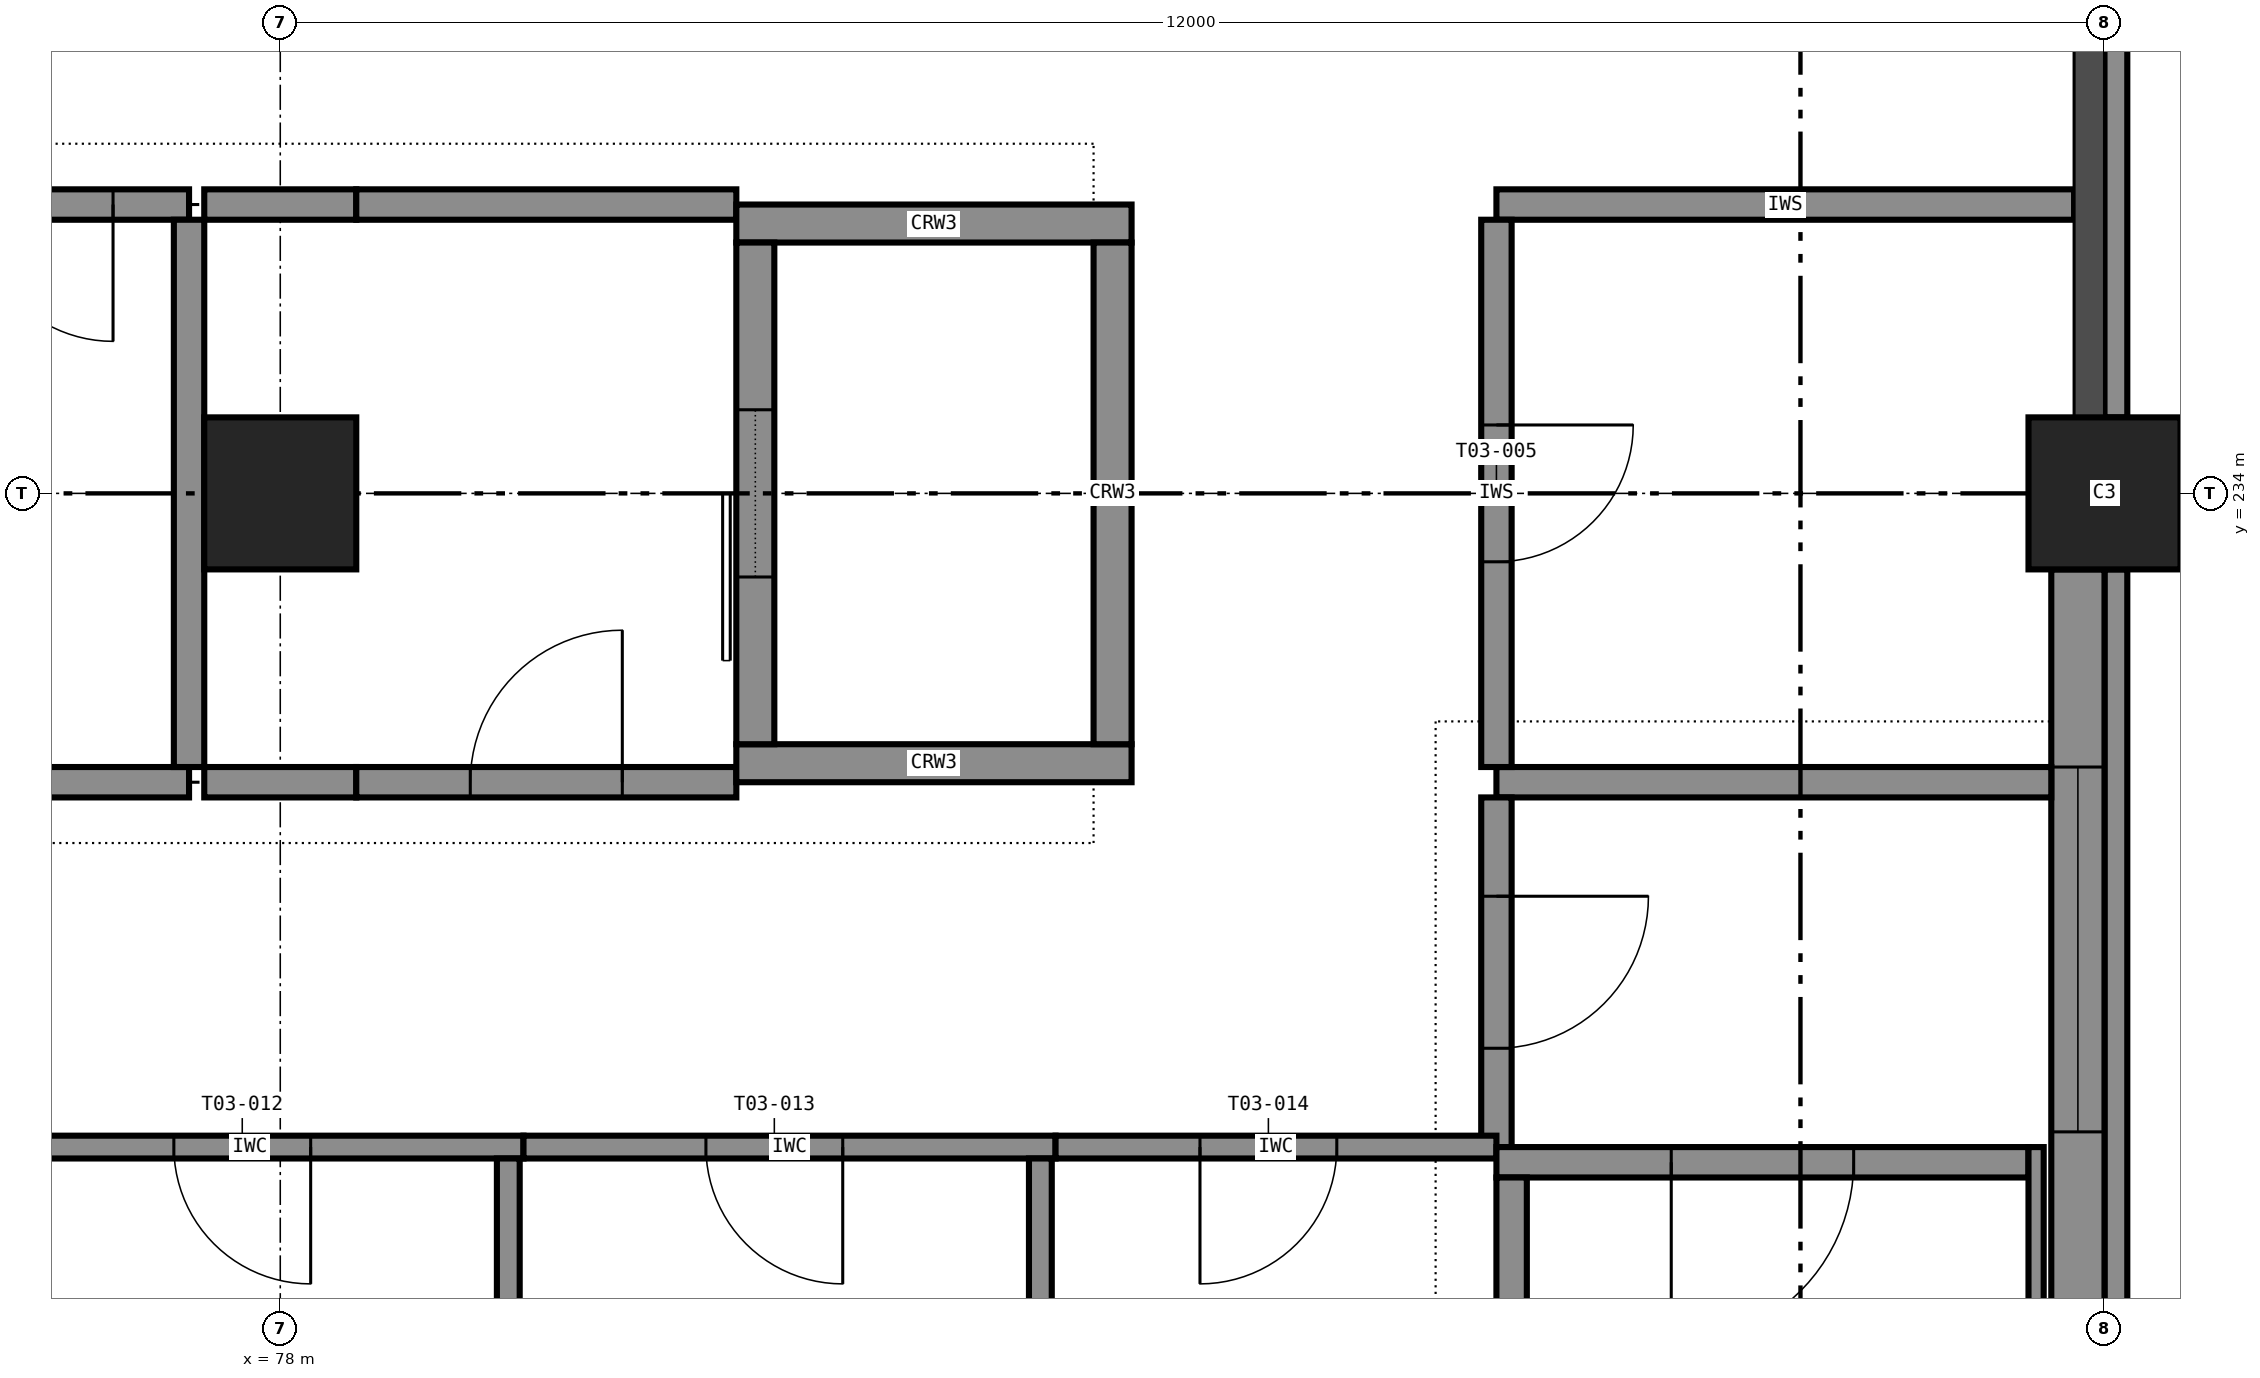
"""IFC4 building model, lengths in metres.
Left out: names, types, materials, properties, quantities, classifications, styles, units other than length and angle.
Written with IfcOpenShell. Run it as: python <this file> out.ifc"""

import sys

from ifc_helpers import new_model, si_unit, direction, frame, frame_2d, origin, origin_2d, place, context, subcontext, project, spatial, rectangle, extrude, element, fill, save


model = new_model("IFC4")
c1 = context("Model", 3, precision=1e-05, world=origin(), true_north=direction((0.0, 1.0)))
c2 = subcontext(c1, "Body", "Model", "MODEL_VIEW")
j1 = project(units=[si_unit("LENGTHUNIT", "METRE"), si_unit("PLANEANGLEUNIT", "RADIAN")], contexts=[c1])
p1 = place(None, origin())
s1 = spatial("IfcSite", under=j1, at=p1, CompositionType="ELEMENT")
p2 = place(p1, origin())
s2 = spatial("IfcBuilding", under=s1, at=p2, CompositionType="ELEMENT")
p3 = place(p2, frame((0.0, 0.0, 17.0)))
s3 = spatial("IfcBuildingStorey", under=s2, at=p3, CompositionType="ELEMENT", Elevation=17.0)
for number, where, z_axis, x_axis in (
    (1, (78.0, 234.0, 0.0), (0.0, 0.0, 1.0), (1.0, 0.0, 0.0)),
    (2, (90.0, 234.0, 0.0), (0.0, 0.0, 1.0), (1.0, 0.0, 0.0)),
):
    element("IfcColumn", number, at=place(p3, frame(where, z_axis=z_axis, x_axis=x_axis)), inside=s3, PredefinedType="COLUMN", context=c2, shape_type="SweptSolid", body=[
        extrude(rectangle(XDim=1.0, YDim=1.0, at=origin_2d()), origin(), (0.0, 0.0, 1.0), 4.0),
    ])
for number, where, z_axis, x_axis in (
    (3, (81.0, 232.225, 0.0), (0.0, 0.0, 1.0), (1.0, 0.0, 0.0)),
    (4, (81.0, 235.775, 0.0), (0.0, 0.0, 1.0), (1.0, 0.0, 0.0)),
):
    element("IfcWall", number, at=place(p3, frame(where, z_axis=z_axis, x_axis=x_axis)), inside=s3, PredefinedType="SHEAR", context=c2, shape_type="SweptSolid", body=[
        extrude(rectangle(XDim=2.6, YDim=0.25, at=frame_2d((1.3, 0.0))), origin(), (0.0, 0.0, 1.0), 4.0),
    ])
p4 = place(p3, frame((81.125, 232.35, 0.0), z_axis=(0.0, 0.0, 1.0), x_axis=(0.0, 1.0, 0.0)))
e5 = element("IfcWall", 5, at=p4, inside=s3, PredefinedType="SHEAR", context=c2, shape_type="SweptSolid", body=[
    extrude(rectangle(XDim=3.3, YDim=0.25, at=frame_2d((1.65, 0.0))), origin(), (0.0, 0.0, 1.0), 4.0),
])
p5 = place(p4, frame((1.1, 0.0, 0.0)))
e6 = element("IfcOpeningElement", 6, at=p5, cuts=e5, PredefinedType="OPENING", context=c2, shape_type="SweptSolid", body=[
    extrude(rectangle(XDim=1.1, YDim=2.1, at=frame_2d((0.55, 1.05))), frame((0.0, 0.135, 0.0), z_axis=(0.0, -1.0, 0.0), x_axis=(1.0, 0.0, 0.0)), (0.0, 0.0, 1.0), 0.27),
])
p6 = place(p3, frame((83.475, 232.35, 0.0), z_axis=(0.0, 0.0, 1.0), x_axis=(0.0, 1.0, 0.0)))
e7 = element("IfcWall", 7, at=p6, inside=s3, PredefinedType="SHEAR", context=c2, shape_type="SweptSolid", body=[
    extrude(rectangle(XDim=3.3, YDim=0.25, at=frame_2d((1.65, 0.0))), origin(), (0.0, 0.0, 1.0), 4.0),
])
p7 = place(p3, frame((89.5, 229.6, 0.0), z_axis=(0.0, 0.0, 1.0), x_axis=(-1.0, 0.0, 0.0)))
e8 = element("IfcWall", 8, at=p7, inside=s3, PredefinedType="SHEAR", context=c2, shape_type="SweptSolid", body=[
    extrude(rectangle(XDim=3.5, YDim=0.2, at=frame_2d((1.75, 0.0))), origin(), (0.0, 0.0, 1.0), 4.0),
])
p8 = place(p7, frame((1.15, 0.0, 0.0)))
e9 = element("IfcOpeningElement", 9, at=p8, cuts=e8, PredefinedType="OPENING", context=c2, shape_type="SweptSolid", body=[
    extrude(rectangle(XDim=1.2, YDim=2.1, at=frame_2d((0.6, 1.05))), frame((0.0, 0.11, 0.0), z_axis=(0.0, -1.0, 0.0), x_axis=(1.0, 0.0, 0.0)), (0.0, 0.0, 1.0), 0.22),
])
p9 = place(p3, frame((86.1, 222.0, 0.0), z_axis=(0.0, 0.0, 1.0), x_axis=(0.0, 1.0, 0.0)))
e10 = element("IfcWall", 10, at=p9, inside=s3, PredefinedType="SHEAR", context=c2, shape_type="SweptSolid", body=[
    extrude(rectangle(XDim=7.5, YDim=0.2, at=frame_2d((3.75, 0.0))), origin(), (0.0, 0.0, 1.0), 4.0),
])
p10 = place(p3, frame((89.55, 229.7, 0.0), z_axis=(0.0, 0.0, 1.0), x_axis=(0.0, -1.0, 0.0)))
e11 = element("IfcWall", 11, at=p10, inside=s3, PredefinedType="SHEAR", context=c2, shape_type="SweptSolid", body=[
    extrude(rectangle(XDim=7.7, YDim=0.1, at=frame_2d((3.85, 0.0))), origin(), (0.0, 0.0, 1.0), 3.8),
])
p11 = place(p3, frame((89.825, 222.5, 0.0), z_axis=(0.0, 0.0, 1.0), x_axis=(0.0, 1.0, 0.0)))
e12 = element("IfcWall", 12, at=p11, inside=s3, PredefinedType="STANDARD", context=c2, shape_type="SweptSolid", body=[
    extrude(rectangle(XDim=11.0, YDim=0.35, at=frame_2d((5.5, 0.0))), origin(), (0.0, 0.0, 1.0), 3.0),
])
p12 = place(p11, frame((1.3, 0.0, 0.6)))
e13 = element("IfcOpeningElement", 13, at=p12, cuts=e12, PredefinedType="OPENING", context=c2, shape_type="SweptSolid", body=[
    extrude(rectangle(XDim=2.4, YDim=2.4, at=frame_2d((1.2, 1.2))), frame((0.0, 0.185, 0.0), z_axis=(0.0, -1.0, 0.0), x_axis=(1.0, 0.0, 0.0)), (0.0, 0.0, 1.0), 0.37),
])
p13 = place(p11, frame((7.3, 0.0, 0.6)))
e14 = element("IfcOpeningElement", 14, at=p13, cuts=e12, PredefinedType="OPENING", context=c2, shape_type="SweptSolid", body=[
    extrude(rectangle(XDim=2.4, YDim=2.4, at=frame_2d((1.2, 1.2))), frame((0.0, 0.185, 0.0), z_axis=(0.0, -1.0, 0.0), x_axis=(1.0, 0.0, 0.0)), (0.0, 0.0, 1.0), 0.37),
])
for number, where, z_axis, x_axis in (
    (15, (90.075, 222.5, 3.8), (0.0, 0.0, 1.0), (0.0, 1.0, 0.0)),
    (16, (90.075, 234.5, 3.8), (0.0, 0.0, 1.0), (0.0, 1.0, 0.0)),
):
    element("IfcWall", number, at=place(p3, frame(where, z_axis=z_axis, x_axis=x_axis)), inside=s3, PredefinedType="STANDARD", context=c2, shape_type="SweptSolid", body=[
        extrude(rectangle(XDim=11.0, YDim=0.15, at=frame_2d((5.5, 0.0))), origin(), (0.0, 0.0, 1.0), 0.2),
    ])
p14 = place(p3, frame((75.5, 232.1, 0.0), z_axis=(0.0, 0.0, 1.0), x_axis=(1.0, 0.0, 0.0)))
e17 = element("IfcWall", 17, at=p14, inside=s3, PredefinedType="PARTITIONING", context=c2, shape_type="SweptSolid", body=[
    extrude(rectangle(XDim=1.9, YDim=0.2, at=frame_2d((0.95, 0.0))), origin(), (0.0, 0.0, 1.0), 3.8),
])
p15 = place(p3, frame((77.5, 232.1, 0.0), z_axis=(0.0, 0.0, 1.0), x_axis=(1.0, 0.0, 0.0)))
e18 = element("IfcWall", 18, at=p15, inside=s3, PredefinedType="PARTITIONING", context=c2, shape_type="SweptSolid", body=[
    extrude(rectangle(XDim=1.0, YDim=0.2, at=frame_2d((0.5, 0.0))), origin(), (0.0, 0.0, 1.0), 3.8),
])
p16 = place(p3, frame((78.5, 232.1, 0.0), z_axis=(0.0, 0.0, 1.0), x_axis=(1.0, 0.0, 0.0)))
e19 = element("IfcWall", 19, at=p16, inside=s3, PredefinedType="PARTITIONING", context=c2, shape_type="SweptSolid", body=[
    extrude(rectangle(XDim=2.5, YDim=0.2, at=frame_2d((1.25, 0.0))), origin(), (0.0, 0.0, 1.0), 3.8),
])
p17 = place(p16, frame((0.75, 0.0, 0.0)))
e20 = element("IfcOpeningElement", 20, at=p17, cuts=e19, PredefinedType="OPENING", context=c2, shape_type="SweptSolid", body=[
    extrude(rectangle(XDim=1.0, YDim=2.1, at=frame_2d((0.5, 1.05))), frame((0.0, 0.11, 0.0), z_axis=(0.0, -1.0, 0.0), x_axis=(1.0, 0.0, 0.0)), (0.0, 0.0, 1.0), 0.22),
])
p18 = place(p3, frame((86.0, 232.1, 0.0), z_axis=(0.0, 0.0, 1.0), x_axis=(1.0, 0.0, 0.0)))
e21 = element("IfcWall", 21, at=p18, inside=s3, PredefinedType="PARTITIONING", context=c2, shape_type="SweptSolid", body=[
    extrude(rectangle(XDim=3.65, YDim=0.2, at=frame_2d((1.825, 0.0))), origin(), (0.0, 0.0, 1.0), 3.8),
])
p19 = place(p3, frame((77.4, 235.9, 0.0), z_axis=(0.0, 0.0, 1.0), x_axis=(-1.0, 0.0, 0.0)))
e22 = element("IfcWall", 22, at=p19, inside=s3, PredefinedType="PARTITIONING", context=c2, shape_type="SweptSolid", body=[
    extrude(rectangle(XDim=1.9, YDim=0.2, at=frame_2d((0.95, 0.0))), origin(), (0.0, 0.0, 1.0), 3.8),
])
p20 = place(p19, frame((0.5, 0.0, 0.0)))
e23 = element("IfcOpeningElement", 23, at=p20, cuts=e22, PredefinedType="OPENING", context=c2, shape_type="SweptSolid", body=[
    extrude(rectangle(XDim=0.9, YDim=2.1, at=frame_2d((0.45, 1.05))), frame((0.0, 0.11, 0.0), z_axis=(0.0, -1.0, 0.0), x_axis=(1.0, 0.0, 0.0)), (0.0, 0.0, 1.0), 0.22),
])
p21 = place(p3, frame((77.5, 235.9, 0.0), z_axis=(0.0, 0.0, 1.0), x_axis=(1.0, 0.0, 0.0)))
e24 = element("IfcWall", 24, at=p21, inside=s3, PredefinedType="PARTITIONING", context=c2, shape_type="SweptSolid", body=[
    extrude(rectangle(XDim=1.0, YDim=0.2, at=frame_2d((0.5, 0.0))), origin(), (0.0, 0.0, 1.0), 3.8),
])
p22 = place(p3, frame((78.5, 235.9, 0.0), z_axis=(0.0, 0.0, 1.0), x_axis=(1.0, 0.0, 0.0)))
e25 = element("IfcWall", 25, at=p22, inside=s3, PredefinedType="PARTITIONING", context=c2, shape_type="SweptSolid", body=[
    extrude(rectangle(XDim=2.5, YDim=0.2, at=frame_2d((1.25, 0.0))), origin(), (0.0, 0.0, 1.0), 3.8),
])
p23 = place(p3, frame((86.0, 235.9, 0.0), z_axis=(0.0, 0.0, 1.0), x_axis=(1.0, 0.0, 0.0)))
e26 = element("IfcWall", 26, at=p23, inside=s3, PredefinedType="PARTITIONING", context=c2, shape_type="SweptSolid", body=[
    extrude(rectangle(XDim=3.8, YDim=0.2, at=frame_2d((1.9, 0.0))), origin(), (0.0, 0.0, 1.0), 3.8),
])
p24 = place(p3, frame((77.4, 232.2, 0.0), z_axis=(0.0, 0.0, 1.0), x_axis=(0.0, 1.0, 0.0)))
e27 = element("IfcWall", 27, at=p24, inside=s3, PredefinedType="PARTITIONING", context=c2, shape_type="SweptSolid", body=[
    extrude(rectangle(XDim=3.6, YDim=0.2, at=frame_2d((1.8, 0.0))), origin(), (0.0, 0.0, 1.0), 3.8),
])
p25 = place(p3, frame((86.0, 235.8, 0.0), z_axis=(0.0, 0.0, 1.0), x_axis=(0.0, -1.0, 0.0)))
e28 = element("IfcWall", 28, at=p25, inside=s3, PredefinedType="PARTITIONING", context=c2, shape_type="SweptSolid", body=[
    extrude(rectangle(XDim=3.6, YDim=0.2, at=frame_2d((1.8, 0.0))), origin(), (0.0, 0.0, 1.0), 3.8),
])
p26 = place(p25, frame((1.35, 0.0, 0.0)))
e29 = element("IfcOpeningElement", 29, at=p26, cuts=e28, PredefinedType="OPENING", context=c2, shape_type="SweptSolid", body=[
    extrude(rectangle(XDim=0.9, YDim=2.1, at=frame_2d((0.45, 1.05))), frame((0.0, 0.11, 0.0), z_axis=(0.0, -1.0, 0.0), x_axis=(1.0, 0.0, 0.0)), (0.0, 0.0, 1.0), 0.22),
])
p27 = place(p3, frame((86.0, 232.0, 0.0), z_axis=(0.0, 0.0, 1.0), x_axis=(0.0, -1.0, 0.0)))
e30 = element("IfcWall", 30, at=p27, inside=s3, PredefinedType="PARTITIONING", context=c2, shape_type="SweptSolid", body=[
    extrude(rectangle(XDim=2.3, YDim=0.2, at=frame_2d((1.15, 0.0))), origin(), (0.0, 0.0, 1.0), 3.8),
])
p28 = place(p27, frame((0.65, 0.0, 0.0)))
e31 = element("IfcOpeningElement", 31, at=p28, cuts=e30, PredefinedType="OPENING", context=c2, shape_type="SweptSolid", body=[
    extrude(rectangle(XDim=1.0, YDim=2.1, at=frame_2d((0.5, 1.05))), frame((0.0, 0.11, 0.0), z_axis=(0.0, -1.0, 0.0), x_axis=(1.0, 0.0, 0.0)), (0.0, 0.0, 1.0), 0.22),
])
p29 = place(p3, frame((79.6, 229.7, 0.0), z_axis=(0.0, 0.0, 1.0), x_axis=(-1.0, 0.0, 0.0)))
e32 = element("IfcWall", 32, at=p29, inside=s3, PredefinedType="PARTITIONING", context=c2, shape_type="SweptSolid", body=[
    extrude(rectangle(XDim=3.6, YDim=0.15, at=frame_2d((1.8, 0.0))), origin(), (0.0, 0.0, 1.0), 3.8),
])
p30 = place(p29, frame((1.4, 0.0, 0.0)))
e33 = element("IfcOpeningElement", 33, at=p30, cuts=e32, PredefinedType="OPENING", context=c2, shape_type="SweptSolid", body=[
    extrude(rectangle(XDim=0.9, YDim=2.1, at=frame_2d((0.45, 1.05))), frame((0.0, 0.085, 0.0), z_axis=(0.0, -1.0, 0.0), x_axis=(1.0, 0.0, 0.0)), (0.0, 0.0, 1.0), 0.17),
])
p31 = place(p3, frame((83.1, 229.7, 0.0), z_axis=(0.0, 0.0, 1.0), x_axis=(-1.0, 0.0, 0.0)))
e34 = element("IfcWall", 34, at=p31, inside=s3, PredefinedType="PARTITIONING", context=c2, shape_type="SweptSolid", body=[
    extrude(rectangle(XDim=3.5, YDim=0.15, at=frame_2d((1.75, 0.0))), origin(), (0.0, 0.0, 1.0), 3.8),
])
p32 = place(p31, frame((1.4, 0.0, 0.0)))
e35 = element("IfcOpeningElement", 35, at=p32, cuts=e34, PredefinedType="OPENING", context=c2, shape_type="SweptSolid", body=[
    extrude(rectangle(XDim=0.9, YDim=2.1, at=frame_2d((0.45, 1.05))), frame((0.0, 0.085, 0.0), z_axis=(0.0, -1.0, 0.0), x_axis=(1.0, 0.0, 0.0)), (0.0, 0.0, 1.0), 0.17),
])
p33 = place(p3, frame((79.5, 222.4, 0.0), z_axis=(0.0, 0.0, 1.0), x_axis=(0.0, 1.0, 0.0)))
e36 = element("IfcWall", 36, at=p33, inside=s3, PredefinedType="PARTITIONING", context=c2, shape_type="SweptSolid", body=[
    extrude(rectangle(XDim=7.225, YDim=0.15, at=frame_2d((3.613, 0.0))), origin(), (0.0, 0.0, 1.0), 3.8),
])
p34 = place(p3, frame((86.0, 229.7, 0.0), z_axis=(0.0, 0.0, 1.0), x_axis=(-1.0, 0.0, 0.0)))
e37 = element("IfcWall", 37, at=p34, inside=s3, PredefinedType="PARTITIONING", context=c2, shape_type="SweptSolid", body=[
    extrude(rectangle(XDim=2.9, YDim=0.15, at=frame_2d((1.45, 0.0))), origin(), (0.0, 0.0, 1.0), 3.8),
])
p35 = place(p34, frame((1.05, 0.0, 0.0)))
e38 = element("IfcOpeningElement", 38, at=p35, cuts=e37, PredefinedType="OPENING", context=c2, shape_type="SweptSolid", body=[
    extrude(rectangle(XDim=0.9, YDim=2.1, at=frame_2d((0.45, 1.05))), frame((0.0, 0.085, 0.0), z_axis=(0.0, -1.0, 0.0), x_axis=(1.0, 0.0, 0.0)), (0.0, 0.0, 1.0), 0.17),
])
p36 = place(p3, frame((83.0, 222.4, 0.0), z_axis=(0.0, 0.0, 1.0), x_axis=(0.0, 1.0, 0.0)))
e39 = element("IfcWall", 39, at=p36, inside=s3, PredefinedType="PARTITIONING", context=c2, shape_type="SweptSolid", body=[
    extrude(rectangle(XDim=7.225, YDim=0.15, at=frame_2d((3.613, 0.0))), origin(), (0.0, 0.0, 1.0), 3.8),
])
p37 = place(p13, origin())
e40 = element("IfcWindow", 40, at=p37, inside=s3, PartitioningType="SINGLE_PANEL", PredefinedType="WINDOW", context=c2, shape_type="SweptSolid", body=[
    extrude(rectangle(XDim=2.4, YDim=2.4, at=frame_2d((1.2, 1.2))), frame((0.0, 0.03, 0.0), z_axis=(0.0, -1.0, 0.0), x_axis=(1.0, 0.0, 0.0)), (0.0, 0.0, 1.0), 0.06),
])
fill(e14, e40)
p38 = place(p20, origin())
e41 = element("IfcDoor", 41, at=p38, inside=s3, OperationType="SINGLE_SWING_LEFT", PredefinedType="DOOR", context=c2, shape_type="SweptSolid", body=[
    extrude(rectangle(XDim=0.9, YDim=2.1, at=frame_2d((0.45, 1.05))), frame((0.0, 0.025, 0.0), z_axis=(0.0, -1.0, 0.0), x_axis=(1.0, 0.0, 0.0)), (0.0, 0.0, 1.0), 0.05),
])
fill(e23, e41)
p39 = place(p17, origin())
e42 = element("IfcDoor", 42, at=p39, inside=s3, OperationType="SINGLE_SWING_RIGHT", PredefinedType="DOOR", context=c2, shape_type="SweptSolid", body=[
    extrude(rectangle(XDim=1.0, YDim=2.1, at=frame_2d((0.5, 1.05))), frame((0.0, 0.025, 0.0), z_axis=(0.0, -1.0, 0.0), x_axis=(1.0, 0.0, 0.0)), (0.0, 0.0, 1.0), 0.05),
])
fill(e20, e42)
p40 = place(p26, origin())
e43 = element("IfcDoor", 43, at=p40, inside=s3, OperationType="SINGLE_SWING_LEFT", PredefinedType="DOOR", context=c2, shape_type="SweptSolid", body=[
    extrude(rectangle(XDim=0.9, YDim=2.1, at=frame_2d((0.45, 1.05))), frame((0.0, 0.025, 0.0), z_axis=(0.0, -1.0, 0.0), x_axis=(1.0, 0.0, 0.0)), (0.0, 0.0, 1.0), 0.05),
])
fill(e29, e43)
p41 = place(p28, origin())
e44 = element("IfcDoor", 44, at=p41, inside=s3, OperationType="SINGLE_SWING_LEFT", PredefinedType="DOOR", context=c2, shape_type="SweptSolid", body=[
    extrude(rectangle(XDim=1.0, YDim=2.1, at=frame_2d((0.5, 1.05))), frame((0.0, 0.025, 0.0), z_axis=(0.0, -1.0, 0.0), x_axis=(1.0, 0.0, 0.0)), (0.0, 0.0, 1.0), 0.05),
])
fill(e31, e44)
p42 = place(p30, origin())
e45 = element("IfcDoor", 45, at=p42, inside=s3, OperationType="SINGLE_SWING_LEFT", PredefinedType="DOOR", context=c2, shape_type="SweptSolid", body=[
    extrude(rectangle(XDim=0.9, YDim=2.1, at=frame_2d((0.45, 1.05))), frame((0.0, 0.025, 0.0), z_axis=(0.0, -1.0, 0.0), x_axis=(1.0, 0.0, 0.0)), (0.0, 0.0, 1.0), 0.05),
])
fill(e33, e45)
p43 = place(p32, origin())
e46 = element("IfcDoor", 46, at=p43, inside=s3, OperationType="SINGLE_SWING_LEFT", PredefinedType="DOOR", context=c2, shape_type="SweptSolid", body=[
    extrude(rectangle(XDim=0.9, YDim=2.1, at=frame_2d((0.45, 1.05))), frame((0.0, 0.025, 0.0), z_axis=(0.0, -1.0, 0.0), x_axis=(1.0, 0.0, 0.0)), (0.0, 0.0, 1.0), 0.05),
])
fill(e35, e46)
p44 = place(p35, origin())
e47 = element("IfcDoor", 47, at=p44, inside=s3, OperationType="SINGLE_SWING_RIGHT", PredefinedType="DOOR", context=c2, shape_type="SweptSolid", body=[
    extrude(rectangle(XDim=0.9, YDim=2.1, at=frame_2d((0.45, 1.05))), frame((0.0, 0.025, 0.0), z_axis=(0.0, -1.0, 0.0), x_axis=(1.0, 0.0, 0.0)), (0.0, 0.0, 1.0), 0.05),
])
fill(e38, e47)
p45 = place(p5, origin())
e48 = element("IfcDoor", 48, at=p45, inside=s3, OperationType="SLIDING_TO_LEFT", PredefinedType="DOOR", context=c2, shape_type="SweptSolid", body=[
    extrude(rectangle(XDim=1.1, YDim=2.1, at=frame_2d((0.55, 1.05))), frame((0.0, 0.025, 0.0), z_axis=(0.0, -1.0, 0.0), x_axis=(1.0, 0.0, 0.0)), (0.0, 0.0, 1.0), 0.05),
])
fill(e6, e48)
p46 = place(p8, origin())
e49 = element("IfcDoor", 49, at=p46, inside=s3, OperationType="SINGLE_SWING_RIGHT", PredefinedType="DOOR", context=c2, shape_type="SweptSolid", body=[
    extrude(rectangle(XDim=1.2, YDim=2.1, at=frame_2d((0.6, 1.05))), frame((0.0, 0.025, 0.0), z_axis=(0.0, -1.0, 0.0), x_axis=(1.0, 0.0, 0.0)), (0.0, 0.0, 1.0), 0.05),
])
fill(e9, e49)
save(model, sys.argv[1])
